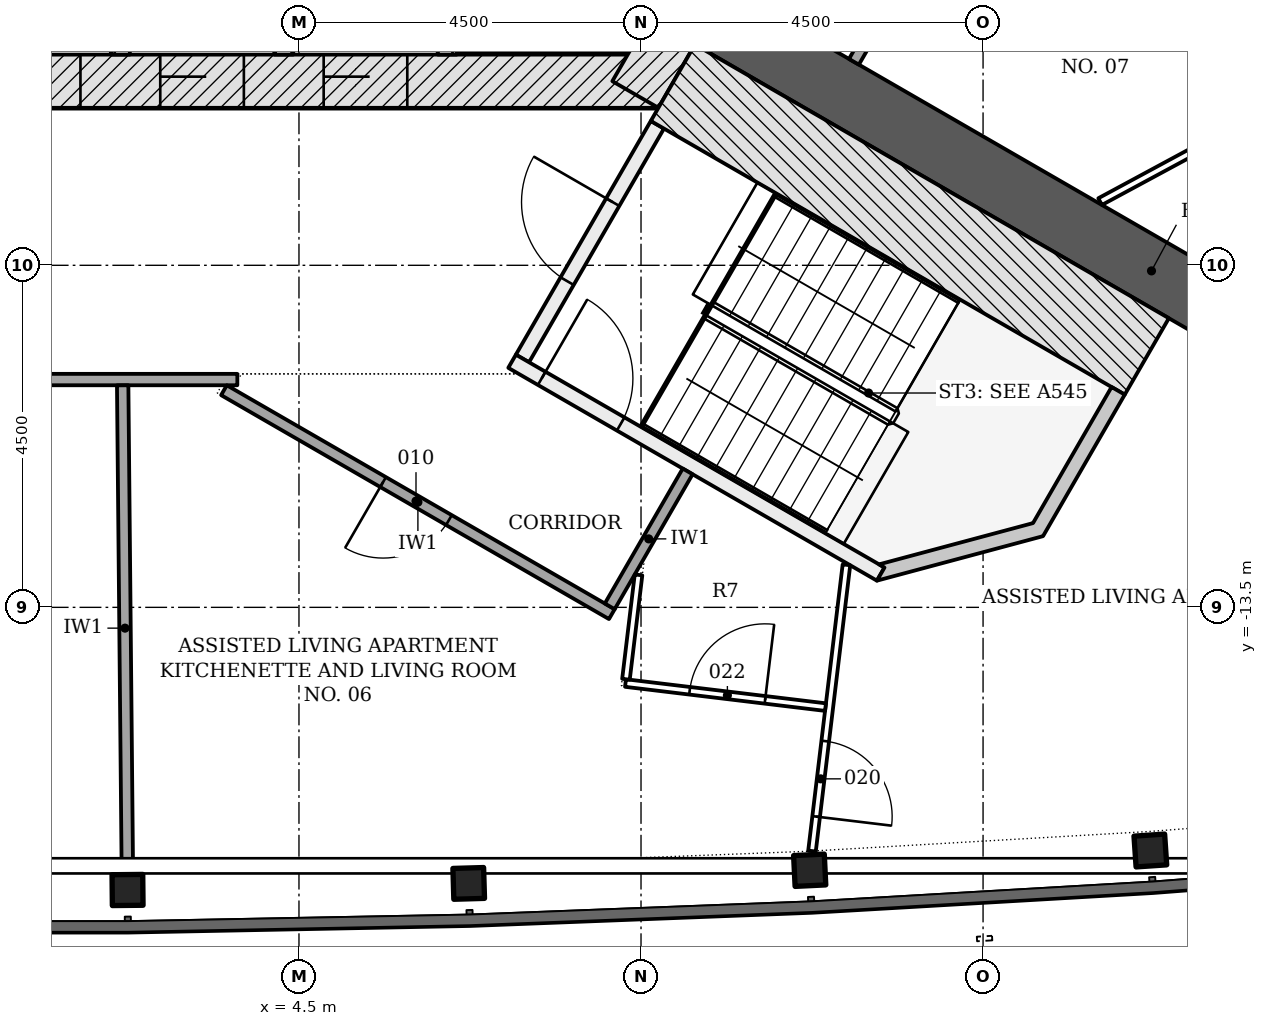
"""IFC4 building model, lengths in metres.
Left out: names, types, materials, properties, quantities, classifications, styles, units other than length and angle.
Written with IfcOpenShell. Run it as: python <this file> out.ifc"""

import sys

from ifc_helpers import new_model, si_unit, direction, frame, frame_2d, origin, origin_2d, place, context, subcontext, project, spatial, polyline, rectangle, i_section, outline, extrude, element, fill, save


model = new_model("IFC4")
c1 = context("Model", 3, precision=1e-05, world=origin(), true_north=direction((0.0, 1.0)))
c2 = subcontext(c1, "Body", "Model", "MODEL_VIEW")
j1 = project(units=[si_unit("LENGTHUNIT", "METRE"), si_unit("PLANEANGLEUNIT", "RADIAN")], contexts=[c1])
p1 = place(None, origin())
s1 = spatial("IfcSite", under=j1, at=p1, CompositionType="ELEMENT")
p2 = place(p1, origin())
s2 = spatial("IfcBuilding", under=s1, at=p2, CompositionType="ELEMENT")
p3 = place(p2, frame((0.0, 0.0, 72.6)))
s3 = spatial("IfcBuildingStorey", under=s2, at=p3, CompositionType="ELEMENT", Elevation=72.6)
p4 = place(p3, frame((-9.229, -6.578, -0.2), z_axis=(0.0, 0.0, 1.0), x_axis=(1.0, 0.0, 0.0)))
e1 = element("IfcWall", 1, at=p4, inside=s3, PredefinedType="SHEAR", context=c2, shape_type="SweptSolid", body=[
    extrude(rectangle(XDim=18.458, YDim=0.7, at=frame_2d((9.229, 0.0))), origin(), (0.0, 0.0, 1.0), 3.6),
])
p5 = place(p4, frame((3.304, 0.0, 0.2)))
e2 = element("IfcOpeningElement", 2, at=p5, cuts=e1, PredefinedType="OPENING", context=c2, shape_type="SweptSolid", body=[
    extrude(rectangle(XDim=1.1, YDim=2.1, at=frame_2d((0.55, 1.05))), frame((0.0, 0.36, 0.0), z_axis=(0.0, -1.0, 0.0), x_axis=(1.0, 0.0, 0.0)), (0.0, 0.0, 1.0), 0.72),
])
p6 = place(p4, frame((5.454, 0.0, 0.2)))
e3 = element("IfcOpeningElement", 3, at=p6, cuts=e1, PredefinedType="OPENING", context=c2, shape_type="SweptSolid", body=[
    extrude(rectangle(XDim=1.1, YDim=2.1, at=frame_2d((0.55, 1.05))), frame((0.0, 0.36, 0.0), z_axis=(0.0, -1.0, 0.0), x_axis=(1.0, 0.0, 0.0)), (0.0, 0.0, 1.0), 0.72),
])
p7 = place(p4, frame((7.604, 0.0, 0.2)))
e4 = element("IfcOpeningElement", 4, at=p7, cuts=e1, PredefinedType="OPENING", context=c2, shape_type="SweptSolid", body=[
    extrude(rectangle(XDim=1.1, YDim=2.1, at=frame_2d((0.55, 1.05))), frame((0.0, 0.36, 0.0), z_axis=(0.0, -1.0, 0.0), x_axis=(1.0, 0.0, 0.0)), (0.0, 0.0, 1.0), 0.72),
])
p8 = place(p4, frame((9.754, 0.0, 0.2)))
e5 = element("IfcOpeningElement", 5, at=p8, cuts=e1, PredefinedType="OPENING", context=c2, shape_type="SweptSolid", body=[
    extrude(rectangle(XDim=1.1, YDim=2.1, at=frame_2d((0.55, 1.05))), frame((0.0, 0.36, 0.0), z_axis=(0.0, -1.0, 0.0), x_axis=(1.0, 0.0, 0.0)), (0.0, 0.0, 1.0), 0.72),
])
p9 = place(p4, frame((11.904, 0.0, 0.2)))
e6 = element("IfcOpeningElement", 6, at=p9, cuts=e1, PredefinedType="OPENING", context=c2, shape_type="SweptSolid", body=[
    extrude(rectangle(XDim=1.1, YDim=2.1, at=frame_2d((0.55, 1.05))), frame((0.0, 0.36, 0.0), z_axis=(0.0, -1.0, 0.0), x_axis=(1.0, 0.0, 0.0)), (0.0, 0.0, 1.0), 0.72),
])
p10 = place(p4, frame((14.054, 0.0, 0.2)))
e7 = element("IfcOpeningElement", 7, at=p10, cuts=e1, PredefinedType="OPENING", context=c2, shape_type="SweptSolid", body=[
    extrude(rectangle(XDim=1.1, YDim=2.1, at=frame_2d((0.55, 1.05))), frame((0.0, 0.36, 0.0), z_axis=(0.0, -1.0, 0.0), x_axis=(1.0, 0.0, 0.0)), (0.0, 0.0, 1.0), 0.72),
])
p11 = place(p4, frame((1.029, 0.0, 0.2)))
e8 = element("IfcOpeningElement", 8, at=p11, cuts=e1, PredefinedType="OPENING", context=c2, shape_type="SweptSolid", body=[
    extrude(rectangle(XDim=1.0, YDim=2.1, at=frame_2d((0.5, 1.05))), frame((0.0, 0.36, 0.0), z_axis=(0.0, -1.0, 0.0), x_axis=(1.0, 0.0, 0.0)), (0.0, 0.0, 1.0), 0.72),
])
p12 = place(p3, frame((8.926, -6.753, -0.2), z_axis=(0.0, 0.0, 1.0), x_axis=(0.500042739161, 0.866000726912, 0.0)))
e9 = element("IfcWall", 9, at=p12, inside=s3, PredefinedType="SHEAR", context=c2, shape_type="SweptSolid", body=[
    extrude(rectangle(XDim=2.771, YDim=0.7, at=frame_2d((1.386, 0.0))), origin(), (0.0, 0.0, 1.0), 3.6),
])
p13 = place(p3, frame((9.922, -5.728, -0.2), z_axis=(0.0, 0.0, 1.0), x_axis=(0.866026077102, -0.499998833779, 0.0)))
e10 = element("IfcWall", 10, at=p13, inside=s3, PredefinedType="SHEAR", context=c2, shape_type="SweptSolid", body=[
    extrude(rectangle(XDim=13.381, YDim=0.85, at=frame_2d((6.691, 0.0))), origin(), (0.0, 0.0, 1.0), 3.6),
])
for number, where, z_axis, x_axis in (
    (11, (2.245, -17.218, -0.2), (0.0, 0.0, 1.0), (1.0, 0.01, 0.0)),
    (12, (6.733, -17.132, -0.2), (0.0, 0.0, 1.0), (1.0, 0.029, 0.0)),
    (13, (11.219, -16.958, -0.2), (0.0, 0.0, 1.0), (0.999, 0.048, 0.0)),
    (14, (15.701, -16.699, -0.2), (0.0, 0.0, 1.0), (0.998, 0.067, 0.0)),
):
    element("IfcColumn", number, at=place(p3, frame(where, z_axis=z_axis, x_axis=x_axis)), inside=s3, PredefinedType="COLUMN", context=c2, shape_type="SweptSolid", body=[
        extrude(i_section(OverallWidth=0.404, OverallDepth=0.406, WebThickness=0.027, FlangeThickness=0.044, FilletRadius=0.015, at=origin_2d()), origin(), (0.0, 0.0, 1.0), 3.6),
    ])
for number, where, z_axis, x_axis in (
    (15, (2.15, -6.228, -0.2), (0.0, 0.0, 1.0), (0.0, 1.0, 0.0)),
    (16, (4.3, -6.228, -0.2), (0.0, 0.0, 1.0), (0.0, 1.0, 0.0)),
    (17, (6.45, -6.228, -0.2), (0.0, 0.0, 1.0), (0.0, 1.0, 0.0)),
):
    element("IfcWall", number, at=place(p3, frame(where, z_axis=z_axis, x_axis=x_axis)), inside=s3, PredefinedType="PARTITIONING", context=c2, shape_type="SweptSolid", body=[
        extrude(rectangle(XDim=2.5, YDim=0.25, at=frame_2d((1.25, 0.0))), origin(), (0.0, 0.0, 1.0), 3.6),
    ])
p14 = place(p3, frame((7.44, -10.226, -0.2), z_axis=(0.0, 0.0, 1.0), x_axis=(0.500022077904, 0.866012656725, 0.0)))
e18 = element("IfcWall", 18, at=p14, inside=s3, PredefinedType="SHEAR", context=c2, shape_type="SweptSolid", body=[
    extrude(rectangle(XDim=3.55, YDim=0.2, at=frame_2d((1.775, 0.0))), origin(), (0.0, 0.0, 1.0), 3.6),
])
p15 = place(p14, frame((1.175, 0.0, 0.2)))
e19 = element("IfcOpeningElement", 19, at=p15, cuts=e18, PredefinedType="OPENING", context=c2, shape_type="SweptSolid", body=[
    extrude(rectangle(XDim=1.2, YDim=2.1, at=frame_2d((0.6, 1.05))), frame((0.0, 0.11, 0.0), z_axis=(0.0, -1.0, 0.0), x_axis=(1.0, 0.0, 0.0)), (0.0, 0.0, 1.0), 0.22),
])
p16 = place(p3, frame((7.304, -10.262, -0.2), z_axis=(0.0, 0.0, 1.0), x_axis=(0.866026594901, -0.49999793692, 0.0)))
e20 = element("IfcWall", 20, at=p16, inside=s3, PredefinedType="SHEAR", context=c2, shape_type="SweptSolid", body=[
    extrude(rectangle(XDim=5.6, YDim=0.2, at=frame_2d((2.8, 0.0))), origin(), (0.0, 0.0, 1.0), 3.6),
])
p17 = place(p16, frame((0.45, 0.0, 0.2)))
e21 = element("IfcOpeningElement", 21, at=p17, cuts=e20, PredefinedType="OPENING", context=c2, shape_type="SweptSolid", body=[
    extrude(rectangle(XDim=1.2, YDim=2.1, at=frame_2d((0.6, 1.05))), frame((0.0, 0.11, 0.0), z_axis=(0.0, -1.0, 0.0), x_axis=(1.0, 0.0, 0.0)), (0.0, 0.0, 1.0), 0.22),
])
p18 = place(p3, frame((9.419, -6.599, -0.2), z_axis=(0.0, 0.0, 1.0), x_axis=(0.866033125095, -0.499986626058, 0.0)))
e22 = element("IfcWall", 22, at=p18, inside=s3, PredefinedType="SHEAR", context=c2, shape_type="SweptSolid", body=[
    extrude(rectangle(XDim=7.2, YDim=1.161, at=frame_2d((3.6, 0.0))), origin(), (0.0, 0.0, 1.0), 3.6),
])
p19 = place(p3, frame((0.0, 0.0, -0.2)))
e23 = element("IfcWall", 23, at=p19, inside=s3, PredefinedType="SHEAR", context=c2, shape_type="SweptSolid", body=[
    extrude(outline(polyline([(12.104, -13.149), (14.289, -12.563), (15.364, -10.701), (15.191, -10.601), (14.157, -12.392), (12.132, -12.934), (12.204, -12.976), (12.204, -12.976), (12.204, -12.976), (12.204, -12.976), (12.204, -12.976), (12.204, -12.976), (12.204, -12.976), (12.204, -12.976), (12.204, -12.976), (12.204, -12.976), (12.204, -12.976), (12.204, -12.976), (12.204, -12.976), (12.204, -12.976), (12.204, -12.976), (12.204, -12.976), (12.204, -12.976), (12.104, -13.149)])), origin(), (0.0, 0.0, 1.0), 3.6),
])
p20 = place(p3, frame((3.689, -10.503, 0.0), z_axis=(0.0, 0.0, 1.0), x_axis=(-1.0, 0.0, 0.0)))
e24 = element("IfcWall", 24, at=p20, inside=s3, PredefinedType="PARTITIONING", context=c2, shape_type="SweptSolid", body=[
    extrude(rectangle(XDim=13.068, YDim=0.15, at=frame_2d((6.534, 0.0))), origin(), (0.0, 0.0, 1.0), 2.778),
])
p21 = place(p20, frame((11.103, 0.0, 0.0)))
e25 = element("IfcOpeningElement", 25, at=p21, cuts=e24, PredefinedType="OPENING", context=c2, shape_type="SweptSolid", body=[
    extrude(rectangle(XDim=1.0, YDim=2.1, at=frame_2d((0.5, 1.05))), frame((0.0, 0.085, 0.0), z_axis=(0.0, -1.0, 0.0), x_axis=(1.0, 0.0, 0.0)), (0.0, 0.0, 1.0), 0.17),
])
p22 = place(p20, frame((8.443, 0.0, 0.0)))
e26 = element("IfcOpeningElement", 26, at=p22, cuts=e24, PredefinedType="OPENING", context=c2, shape_type="SweptSolid", body=[
    extrude(rectangle(XDim=1.0, YDim=2.1, at=frame_2d((0.5, 1.05))), frame((0.0, 0.085, 0.0), z_axis=(0.0, -1.0, 0.0), x_axis=(1.0, 0.0, 0.0)), (0.0, 0.0, 1.0), 0.17),
])
p23 = place(p20, frame((5.879, 0.0, 0.0)))
e27 = element("IfcOpeningElement", 27, at=p23, cuts=e24, PredefinedType="OPENING", context=c2, shape_type="SweptSolid", body=[
    extrude(rectangle(XDim=1.0, YDim=2.1, at=frame_2d((0.5, 1.05))), frame((0.0, 0.085, 0.0), z_axis=(0.0, -1.0, 0.0), x_axis=(1.0, 0.0, 0.0)), (0.0, 0.0, 1.0), 0.17),
])
p24 = place(p20, frame((2.556, 0.0, 0.0)))
e28 = element("IfcOpeningElement", 28, at=p24, cuts=e24, PredefinedType="OPENING", context=c2, shape_type="SweptSolid", body=[
    extrude(rectangle(XDim=1.5, YDim=2.1, at=frame_2d((0.75, 1.05))), frame((0.0, 0.085, 0.0), z_axis=(0.0, -1.0, 0.0), x_axis=(1.0, 0.0, 0.0)), (0.0, 0.0, 1.0), 0.17),
])
p25 = place(p3, frame((8.616, -13.589, 0.0), z_axis=(0.0, 0.0, 1.0), x_axis=(-0.866039313704, 0.499975906538, 0.0)))
e29 = element("IfcWall", 29, at=p25, inside=s3, PredefinedType="PARTITIONING", context=c2, shape_type="SweptSolid", body=[
    extrude(rectangle(XDim=5.892, YDim=0.15, at=frame_2d((2.946, 0.0))), origin(), (0.0, 0.0, 1.0), 2.778),
])
p26 = place(p25, frame((2.475, 0.0, 0.0)))
e30 = element("IfcOpeningElement", 30, at=p26, cuts=e29, PredefinedType="OPENING", context=c2, shape_type="SweptSolid", body=[
    extrude(rectangle(XDim=1.0, YDim=2.1, at=frame_2d((0.5, 1.05))), frame((0.0, 0.085, 0.0), z_axis=(0.0, -1.0, 0.0), x_axis=(1.0, 0.0, 0.0)), (0.0, 0.0, 1.0), 0.17),
])
p27 = place(p3, frame((8.589, -13.487, 0.0), z_axis=(0.0, 0.0, 1.0), x_axis=(0.499956128963, 0.866050731258, 0.0)))
e31 = element("IfcWall", 31, at=p27, inside=s3, PredefinedType="PARTITIONING", context=c2, shape_type="SweptSolid", body=[
    extrude(rectangle(XDim=2.05, YDim=0.15, at=frame_2d((1.025, 0.0))), origin(), (0.0, 0.0, 1.0), 3.4),
])
p28 = place(p3, frame((11.801, -6.323, 0.0), z_axis=(0.0, 0.0, 1.0), x_axis=(0.500058665202, 0.865991530765, 0.0)))
e32 = element("IfcWall", 32, at=p28, inside=s3, PredefinedType="PARTITIONING", context=c2, shape_type="SweptSolid", body=[
    extrude(rectangle(XDim=1.969, YDim=0.15, at=frame_2d((0.985, 0.0))), origin(), (0.0, 0.0, 1.0), 2.778),
])
p29 = place(p3, frame((2.242, -16.968, 0.0), z_axis=(0.0, 0.0, 1.0), x_axis=(-0.009628532285, 0.999953644609, 0.0)))
e33 = element("IfcWall", 33, at=p29, inside=s3, PredefinedType="PARTITIONING", context=c2, shape_type="SweptSolid", body=[
    extrude(rectangle(XDim=6.39, YDim=0.15, at=frame_2d((3.195, 0.0))), origin(), (0.0, 0.0, 1.0), 2.778),
])
p30 = place(p3, frame((11.703, -12.94, 0.0), z_axis=(0.0, 0.0, 1.0), x_axis=(-0.119454840068, -0.99283963518, 0.0)))
e34 = element("IfcWall", 34, at=p30, inside=s3, PredefinedType="PARTITIONING", context=c2, shape_type="SweptSolid", body=[
    extrude(rectangle(XDim=3.793, YDim=0.1, at=frame_2d((1.896, 0.0))), origin(), (0.0, 0.0, 1.0), 2.923),
])
p31 = place(p30, frame((2.336, 0.0, 0.0)))
e35 = element("IfcOpeningElement", 35, at=p31, cuts=e34, PredefinedType="OPENING", context=c2, shape_type="SweptSolid", body=[
    extrude(rectangle(XDim=1.0, YDim=2.1, at=frame_2d((0.5, 1.05))), frame((0.0, 0.06, 0.0), z_axis=(0.0, -1.0, 0.0), x_axis=(1.0, 0.0, 0.0)), (0.0, 0.0, 1.0), 0.12),
])
p32 = place(p3, frame((17.994, -6.569, 0.0), z_axis=(0.0, 0.0, 1.0), x_axis=(-0.880148573472, -0.474698313263, 0.0)))
e36 = element("IfcWall", 36, at=p32, inside=s3, PredefinedType="PARTITIONING", context=c2, shape_type="SweptSolid", body=[
    extrude(rectangle(XDim=3.356, YDim=0.1, at=frame_2d((1.678, 0.0))), origin(), (0.0, 0.0, 1.0), 3.4),
])
p33 = place(p3, frame((8.796, -14.496, 0.0), z_axis=(0.0, 0.0, 1.0), x_axis=(0.992835802838, -0.119486687973, 0.0)))
e37 = element("IfcWall", 37, at=p33, inside=s3, PredefinedType="PARTITIONING", context=c2, shape_type="SweptSolid", body=[
    extrude(rectangle(XDim=2.65, YDim=0.1, at=frame_2d((1.325, 0.0))), origin(), (0.0, 0.0, 1.0), 2.923),
])
p34 = place(p33, frame((0.85, 0.0, 0.0)))
e38 = element("IfcOpeningElement", 38, at=p34, cuts=e37, PredefinedType="OPENING", context=c2, shape_type="SweptSolid", body=[
    extrude(rectangle(XDim=1.0, YDim=2.1, at=frame_2d((0.5, 1.05))), frame((0.0, 0.06, 0.0), z_axis=(0.0, -1.0, 0.0), x_axis=(1.0, 0.0, 0.0)), (0.0, 0.0, 1.0), 0.12),
])
p35 = place(p3, frame((8.967, -13.073, 0.0), z_axis=(0.0, 0.0, 1.0), x_axis=(-0.119493210152, -0.992835017879, 0.0)))
e39 = element("IfcWall", 39, at=p35, inside=s3, PredefinedType="PARTITIONING", context=c2, shape_type="SweptSolid", body=[
    extrude(rectangle(XDim=1.383, YDim=0.1, at=frame_2d((0.692, 0.0))), origin(), (0.0, 0.0, 1.0), 3.4),
])
p36 = place(p8, origin())
e40 = element("IfcDoor", 40, at=p36, inside=s3, OperationType="DOUBLE_DOOR_SLIDING", PredefinedType="DOOR", context=c2, shape_type="SweptSolid", body=[
    extrude(rectangle(XDim=1.1, YDim=2.1, at=frame_2d((0.55, 1.05))), frame((0.0, 0.025, 0.0), z_axis=(0.0, -1.0, 0.0), x_axis=(1.0, 0.0, 0.0)), (0.0, 0.0, 1.0), 0.05),
])
fill(e5, e40)
p37 = place(p9, origin())
e41 = element("IfcDoor", 41, at=p37, inside=s3, OperationType="DOUBLE_DOOR_SLIDING", PredefinedType="DOOR", context=c2, shape_type="SweptSolid", body=[
    extrude(rectangle(XDim=1.1, YDim=2.1, at=frame_2d((0.55, 1.05))), frame((0.0, 0.025, 0.0), z_axis=(0.0, -1.0, 0.0), x_axis=(1.0, 0.0, 0.0)), (0.0, 0.0, 1.0), 0.05),
])
fill(e6, e41)
p38 = place(p10, origin())
e42 = element("IfcDoor", 42, at=p38, inside=s3, OperationType="DOUBLE_DOOR_SLIDING", PredefinedType="DOOR", context=c2, shape_type="SweptSolid", body=[
    extrude(rectangle(XDim=1.1, YDim=2.1, at=frame_2d((0.55, 1.05))), frame((0.0, 0.025, 0.0), z_axis=(0.0, -1.0, 0.0), x_axis=(1.0, 0.0, 0.0)), (0.0, 0.0, 1.0), 0.05),
])
fill(e7, e42)
p39 = place(p15, origin())
e43 = element("IfcDoor", 43, at=p39, inside=s3, OperationType="SINGLE_SWING_RIGHT", PredefinedType="DOOR", context=c2, shape_type="SweptSolid", body=[
    extrude(rectangle(XDim=1.2, YDim=2.1, at=frame_2d((0.6, 1.05))), frame((0.0, 0.025, 0.0), z_axis=(0.0, -1.0, 0.0), x_axis=(1.0, 0.0, 0.0)), (0.0, 0.0, 1.0), 0.05),
])
fill(e19, e43)
p40 = place(p17, origin())
e44 = element("IfcDoor", 44, at=p40, inside=s3, OperationType="SINGLE_SWING_LEFT", PredefinedType="DOOR", context=c2, shape_type="SweptSolid", body=[
    extrude(rectangle(XDim=1.2, YDim=2.1, at=frame_2d((0.6, 1.05))), frame((0.0, 0.025, 0.0), z_axis=(0.0, -1.0, 0.0), x_axis=(1.0, 0.0, 0.0)), (0.0, 0.0, 1.0), 0.05),
])
fill(e21, e44)
p41 = place(p26, origin())
e45 = element("IfcDoor", 45, at=p41, inside=s3, OperationType="SINGLE_SWING_RIGHT", PredefinedType="DOOR", context=c2, shape_type="SweptSolid", body=[
    extrude(rectangle(XDim=1.0, YDim=2.1, at=frame_2d((0.5, 1.05))), frame((0.0, 0.025, 0.0), z_axis=(0.0, -1.0, 0.0), x_axis=(1.0, 0.0, 0.0)), (0.0, 0.0, 1.0), 0.05),
])
fill(e30, e45)
p42 = place(p31, origin())
e46 = element("IfcDoor", 46, at=p42, inside=s3, OperationType="SINGLE_SWING_RIGHT", PredefinedType="DOOR", context=c2, shape_type="SweptSolid", body=[
    extrude(rectangle(XDim=1.0, YDim=2.1, at=frame_2d((0.5, 1.05))), frame((0.0, 0.025, 0.0), z_axis=(0.0, -1.0, 0.0), x_axis=(1.0, 0.0, 0.0)), (0.0, 0.0, 1.0), 0.05),
])
fill(e35, e46)
p43 = place(p34, origin())
e47 = element("IfcDoor", 47, at=p43, inside=s3, OperationType="SINGLE_SWING_RIGHT", PredefinedType="DOOR", context=c2, shape_type="SweptSolid", body=[
    extrude(rectangle(XDim=1.0, YDim=2.1, at=frame_2d((0.5, 1.05))), frame((0.0, 0.025, 0.0), z_axis=(0.0, -1.0, 0.0), x_axis=(1.0, 0.0, 0.0)), (0.0, 0.0, 1.0), 0.05),
])
fill(e38, e47)
save(model, sys.argv[1])
